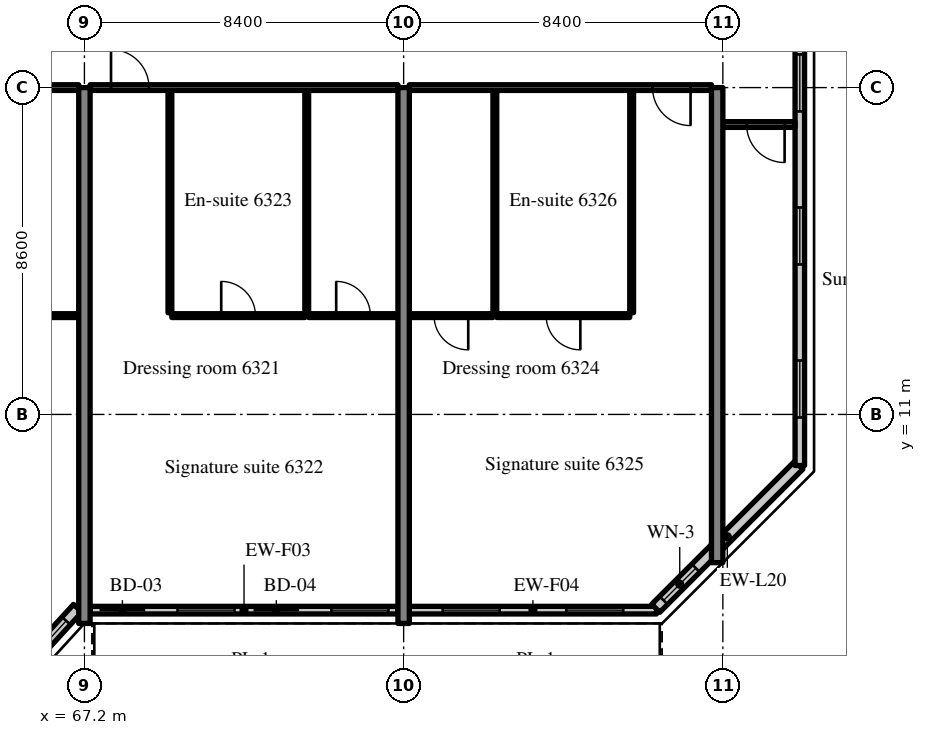
"""IFC4 building model, lengths in metres.
Left out: names, types, materials, properties, quantities, classifications, styles, units other than length and angle.
Written with IfcOpenShell. Run it as: python <this file> out.ifc"""

import sys

from ifc_helpers import new_model, si_unit, direction, frame, frame_2d, origin, place, context, subcontext, project, spatial, rectangle, extrude, source, transform, mapped, element, fill, save


model = new_model("IFC4")
c1 = context("Model", 3, precision=1e-05, world=origin(), true_north=direction((0.0, 1.0)))
c2 = subcontext(c1, "Body", "Model", "MODEL_VIEW")
j1 = project(units=[si_unit("LENGTHUNIT", "METRE"), si_unit("PLANEANGLEUNIT", "RADIAN")], contexts=[c1])
p1 = place(None, origin())
s1 = spatial("IfcSite", under=j1, at=p1, CompositionType="ELEMENT")
p2 = place(p1, origin())
s2 = spatial("IfcBuilding", under=s1, at=p2, CompositionType="ELEMENT")
p3 = place(p2, frame((0.0, 0.0, 260.8)))
s3 = spatial("IfcBuildingStorey", under=s2, at=p3, CompositionType="ELEMENT", Elevation=260.8)
m1 = source(origin(), c2, "Body", "SweptSolid", [
    extrude(rectangle(XDim=14.1, YDim=0.3, at=frame_2d((7.05, 0.0))), origin(), (0.0, 0.0, 1.0), 3.62),
])
for number, where, z_axis, x_axis in (
    (1, (67.2, 5.5, 0.0), (0.0, 0.0, 1.0), (0.0, 1.0, 0.0)),
    (2, (75.6, 5.5, 0.0), (0.0, 0.0, 1.0), (0.0, 1.0, 0.0)),
):
    element("IfcWall", number, at=place(p3, frame(where, z_axis=z_axis, x_axis=x_axis)), inside=s3, PredefinedType="SHEAR", context=c2, shape_type="MappedRepresentation", body=[
        mapped(m1, transform((0.0, 0.0, 0.0), scale=1.0)),
    ])
m2 = source(origin(), c2, "Body", "SweptSolid", [
    extrude(rectangle(XDim=12.5, YDim=0.3, at=frame_2d((6.25, 0.0))), origin(), (0.0, 0.0, 1.0), 3.62),
])
p4 = place(p3, frame((83.85, 7.1, 0.0), z_axis=(0.0, 0.0, 1.0), x_axis=(0.0, 1.0, 0.0)))
e3 = element("IfcWall", 3, at=p4, inside=s3, PredefinedType="SHEAR", context=c2, shape_type="MappedRepresentation", body=[
    mapped(m2, transform((0.0, 0.0, 0.0), scale=1.0)),
])
m3 = source(origin(), c2, "Body", "SweptSolid", [
    extrude(rectangle(XDim=2.398, YDim=0.3, at=frame_2d((1.199, 0.0))), origin(), (0.0, 0.0, 1.0), 3.62),
])
p5 = place(p3, frame((65.404, 4.131, 0.0), z_axis=(0.0, 0.0, 1.0), x_axis=(0.675374189419, 0.737475222815, 0.0)))
e4 = element("IfcWall", 4, at=p5, inside=s3, PredefinedType="SOLIDWALL", context=c2, shape_type="MappedRepresentation", body=[
    mapped(m3, transform((0.0, 0.0, 0.0), scale=1.0)),
])
m4 = source(origin(), c2, "Body", "SweptSolid", [
    extrude(rectangle(XDim=1.5, YDim=2.0, at=frame_2d((0.75, 1.0))), frame((0.0, 0.16, 0.0), z_axis=(0.0, -1.0, 0.0), x_axis=(1.0, 0.0, 0.0)), (0.0, 0.0, 1.0), 0.32),
])
p6 = place(p5, frame((0.449, 0.0, 0.9)))
e5 = element("IfcOpeningElement", 5, at=p6, cuts=e4, PredefinedType="OPENING", context=c2, shape_type="MappedRepresentation", body=[
    mapped(m4, transform((0.0, 0.0, 0.0), scale=1.0)),
])
m5 = source(origin(), c2, "Body", "SweptSolid", [
    extrude(rectangle(XDim=8.1, YDim=0.2, at=frame_2d((4.05, 0.0))), origin(), (0.0, 0.0, 1.0), 3.02),
])
p7 = place(p3, frame((67.35, 5.85, 0.0), z_axis=(0.0, 0.0, 1.0), x_axis=(1.0, 0.0, 0.0)))
e6 = element("IfcWall", 6, at=p7, inside=s3, PredefinedType="SOLIDWALL", context=c2, shape_type="MappedRepresentation", body=[
    mapped(m5, transform((0.0, 0.0, 0.0), scale=1.0)),
])
m6 = source(origin(), c2, "Body", "SweptSolid", [
    extrude(rectangle(XDim=1.2, YDim=2.4, at=frame_2d((0.6, 1.2))), frame((0.0, 0.11, 0.0), z_axis=(0.0, -1.0, 0.0), x_axis=(1.0, 0.0, 0.0)), (0.0, 0.0, 1.0), 0.22),
])
p8 = place(p7, frame((0.25, 0.0, 0.0)))
e7 = element("IfcOpeningElement", 7, at=p8, cuts=e6, PredefinedType="OPENING", context=c2, shape_type="MappedRepresentation", body=[
    mapped(m6, transform((0.0, 0.0, 0.0), scale=1.0)),
])
m7 = source(origin(), c2, "Body", "SweptSolid", [
    extrude(rectangle(XDim=1.5, YDim=1.5, at=frame_2d((0.75, 0.75))), frame((0.0, 0.11, 0.0), z_axis=(0.0, -1.0, 0.0), x_axis=(1.0, 0.0, 0.0)), (0.0, 0.0, 1.0), 0.22),
])
p9 = place(p7, frame((2.3, 0.0, 0.9)))
e8 = element("IfcOpeningElement", 8, at=p9, cuts=e6, PredefinedType="OPENING", context=c2, shape_type="MappedRepresentation", body=[
    mapped(m7, transform((0.0, 0.0, 0.0), scale=1.0)),
])
p10 = place(p7, frame((4.3, 0.0, 0.0)))
e9 = element("IfcOpeningElement", 9, at=p10, cuts=e6, PredefinedType="OPENING", context=c2, shape_type="MappedRepresentation", body=[
    mapped(m6, transform((0.0, 0.0, 0.0), scale=1.0)),
])
p11 = place(p7, frame((6.35, 0.0, 0.9)))
e10 = element("IfcOpeningElement", 10, at=p11, cuts=e6, PredefinedType="OPENING", context=c2, shape_type="MappedRepresentation", body=[
    mapped(m7, transform((0.0, 0.0, 0.0), scale=1.0)),
])
m8 = source(origin(), c2, "Body", "SweptSolid", [
    extrude(rectangle(XDim=6.505, YDim=0.2, at=frame_2d((3.252, 0.0))), origin(), (0.0, 0.0, 1.0), 3.02),
])
p12 = place(p3, frame((75.75, 5.85, 0.0), z_axis=(0.0, 0.0, 1.0), x_axis=(1.0, 0.0, 0.0)))
e11 = element("IfcWall", 11, at=p12, inside=s3, PredefinedType="SOLIDWALL", context=c2, shape_type="MappedRepresentation", body=[
    mapped(m8, transform((0.0, 0.0, 0.0), scale=1.0)),
])
p13 = place(p12, frame((0.876, 0.0, 0.9)))
e12 = element("IfcOpeningElement", 12, at=p13, cuts=e11, PredefinedType="OPENING", context=c2, shape_type="MappedRepresentation", body=[
    mapped(m7, transform((0.0, 0.0, 0.0), scale=1.0)),
])
p14 = place(p12, frame((4.129, 0.0, 0.9)))
e13 = element("IfcOpeningElement", 13, at=p14, cuts=e11, PredefinedType="OPENING", context=c2, shape_type="MappedRepresentation", body=[
    mapped(m7, transform((0.0, 0.0, 0.0), scale=1.0)),
])
m9 = source(origin(), c2, "Body", "SweptSolid", [
    extrude(rectangle(XDim=5.326, YDim=0.3, at=frame_2d((2.663, 0.0))), origin(), (0.0, 0.0, 1.0), 3.62),
])
p15 = place(p3, frame((82.234, 5.9, 0.0), z_axis=(0.0, 0.0, 1.0), x_axis=(0.707083859269, 0.707129702361, 0.0)))
e14 = element("IfcWall", 14, at=p15, inside=s3, PredefinedType="SOLIDWALL", context=c2, shape_type="MappedRepresentation", body=[
    mapped(m9, transform((0.0, 0.0, 0.0), scale=1.0)),
])
m10 = source(origin(), c2, "Body", "SweptSolid", [
    extrude(rectangle(XDim=1.2, YDim=1.5, at=frame_2d((0.6, 0.75))), frame((0.0, 0.16, 0.0), z_axis=(0.0, -1.0, 0.0), x_axis=(1.0, 0.0, 0.0)), (0.0, 0.0, 1.0), 0.32),
])
p16 = place(p15, frame((0.292, 0.0, 0.9)))
e15 = element("IfcOpeningElement", 15, at=p16, cuts=e14, PredefinedType="OPENING", context=c2, shape_type="MappedRepresentation", body=[
    mapped(m10, transform((0.0, 0.0, 0.0), scale=1.0)),
])
m11 = source(origin(), c2, "Body", "SweptSolid", [
    extrude(rectangle(XDim=28.189, YDim=0.25, at=frame_2d((14.095, 0.0))), origin(), (0.0, 0.0, 1.0), 3.62),
])
p17 = place(p3, frame((86.025, 9.655, 0.0), z_axis=(0.0, 0.0, 1.0), x_axis=(0.0, 1.0, 0.0)))
e16 = element("IfcWall", 16, at=p17, inside=s3, PredefinedType="SOLIDWALL", context=c2, shape_type="MappedRepresentation", body=[
    mapped(m11, transform((0.0, 0.0, 0.0), scale=1.0)),
])
m12 = source(origin(), c2, "Body", "SweptSolid", [
    extrude(rectangle(XDim=1.5, YDim=1.5, at=frame_2d((0.75, 0.75))), frame((0.0, 0.135, 0.0), z_axis=(0.0, -1.0, 0.0), x_axis=(1.0, 0.0, 0.0)), (0.0, 0.0, 1.0), 0.27),
])
p18 = place(p17, frame((1.263, 0.0, 0.9)))
e17 = element("IfcOpeningElement", 17, at=p18, cuts=e16, PredefinedType="OPENING", context=c2, shape_type="MappedRepresentation", body=[
    mapped(m12, transform((0.0, 0.0, 0.0), scale=1.0)),
])
p19 = place(p17, frame((5.291, 0.0, 0.9)))
e18 = element("IfcOpeningElement", 18, at=p19, cuts=e16, PredefinedType="OPENING", context=c2, shape_type="MappedRepresentation", body=[
    mapped(m12, transform((0.0, 0.0, 0.0), scale=1.0)),
])
p20 = place(p17, frame((9.318, 0.0, 0.9)))
e19 = element("IfcOpeningElement", 19, at=p20, cuts=e16, PredefinedType="OPENING", context=c2, shape_type="MappedRepresentation", body=[
    mapped(m12, transform((0.0, 0.0, 0.0), scale=1.0)),
])
p21 = place(p17, frame((13.345, 0.0, 0.9)))
e20 = element("IfcOpeningElement", 20, at=p21, cuts=e16, PredefinedType="OPENING", context=c2, shape_type="MappedRepresentation", body=[
    mapped(m12, transform((0.0, 0.0, 0.0), scale=1.0)),
])
p22 = place(p17, frame((17.372, 0.0, 0.9)))
e21 = element("IfcOpeningElement", 21, at=p22, cuts=e16, PredefinedType="OPENING", context=c2, shape_type="MappedRepresentation", body=[
    mapped(m12, transform((0.0, 0.0, 0.0), scale=1.0)),
])
p23 = place(p17, frame((21.399, 0.0, 0.9)))
e22 = element("IfcOpeningElement", 22, at=p23, cuts=e16, PredefinedType="OPENING", context=c2, shape_type="MappedRepresentation", body=[
    mapped(m12, transform((0.0, 0.0, 0.0), scale=1.0)),
])
p24 = place(p17, frame((25.426, 0.0, 0.9)))
e23 = element("IfcOpeningElement", 23, at=p24, cuts=e16, PredefinedType="OPENING", context=c2, shape_type="MappedRepresentation", body=[
    mapped(m12, transform((0.0, 0.0, 0.0), scale=1.0)),
])
m13 = source(origin(), c2, "Body", "SweptSolid", [
    extrude(rectangle(XDim=2.35, YDim=0.1, at=frame_2d((1.175, 0.0))), origin(), (0.0, 0.0, 1.0), 3.62),
])
p25 = place(p3, frame((64.7, 13.6, 0.0), z_axis=(0.0, 0.0, 1.0), x_axis=(1.0, 0.0, 0.0)))
e24 = element("IfcWall", 24, at=p25, inside=s3, PredefinedType="PARTITIONING", context=c2, shape_type="MappedRepresentation", body=[
    mapped(m13, transform((0.0, 0.0, 0.0), scale=1.0)),
])
m14 = source(origin(), c2, "Body", "SweptSolid", [
    extrude(rectangle(XDim=0.9, YDim=2.1, at=frame_2d((0.45, 1.05))), frame((0.0, 0.06, 0.0), z_axis=(0.0, -1.0, 0.0), x_axis=(1.0, 0.0, 0.0)), (0.0, 0.0, 1.0), 0.12),
])
p26 = place(p25, frame((0.725, 0.0, 0.0)))
e25 = element("IfcOpeningElement", 25, at=p26, cuts=e24, PredefinedType="OPENING", context=c2, shape_type="MappedRepresentation", body=[
    mapped(m14, transform((0.0, 0.0, 0.0), scale=1.0)),
])
m15 = source(origin(), c2, "Body", "SweptSolid", [
    extrude(rectangle(XDim=8.1, YDim=0.15, at=frame_2d((4.05, 0.0))), origin(), (0.0, 0.0, 1.0), 2.92),
])
p27 = place(p3, frame((58.95, 19.6, 0.0), z_axis=(0.0, 0.0, 1.0), x_axis=(1.0, 0.0, 0.0)))
e26 = element("IfcWall", 26, at=p27, inside=s3, PredefinedType="PARTITIONING", context=c2, shape_type="MappedRepresentation", body=[
    mapped(m15, transform((0.0, 0.0, 0.0), scale=1.0)),
])
m16 = source(origin(), c2, "Body", "SweptSolid", [
    extrude(rectangle(XDim=1.0, YDim=2.1, at=frame_2d((0.5, 1.05))), frame((0.0, 0.085, 0.0), z_axis=(0.0, -1.0, 0.0), x_axis=(1.0, 0.0, 0.0)), (0.0, 0.0, 1.0), 0.17),
])
p28 = place(p27, frame((0.55, 0.0, 0.0)))
e27 = element("IfcOpeningElement", 27, at=p28, cuts=e26, PredefinedType="OPENING", context=c2, shape_type="MappedRepresentation", body=[
    mapped(m16, transform((0.0, 0.0, 0.0), scale=1.0)),
])
m17 = source(origin(), c2, "Body", "SweptSolid", [
    extrude(rectangle(XDim=5.85, YDim=0.1, at=frame_2d((2.925, 0.0))), origin(), (0.0, 0.0, 1.0), 3.62),
])
for number, where, z_axis, x_axis in (
    (28, (69.45, 13.675, 0.0), (0.0, 0.0, 1.0), (0.0, 1.0, 0.0)),
    (29, (73.05, 13.675, 0.0), (0.0, 0.0, 1.0), (0.0, 1.0, 0.0)),
):
    element("IfcWall", number, at=place(p3, frame(where, z_axis=z_axis, x_axis=x_axis)), inside=s3, PredefinedType="PARTITIONING", context=c2, shape_type="MappedRepresentation", body=[
        mapped(m17, transform((0.0, 0.0, 0.0), scale=1.0)),
    ])
m18 = source(origin(), c2, "Body", "SweptSolid", [
    extrude(rectangle(XDim=3.5, YDim=0.1, at=frame_2d((1.75, 0.0))), origin(), (0.0, 0.0, 1.0), 3.62),
])
p29 = place(p3, frame((69.5, 13.6, 0.0), z_axis=(0.0, 0.0, 1.0), x_axis=(1.0, 0.0, 0.0)))
e30 = element("IfcWall", 30, at=p29, inside=s3, PredefinedType="PARTITIONING", context=c2, shape_type="MappedRepresentation", body=[
    mapped(m18, transform((0.0, 0.0, 0.0), scale=1.0)),
])
p30 = place(p29, frame((1.3, 0.0, 0.0)))
e31 = element("IfcOpeningElement", 31, at=p30, cuts=e30, PredefinedType="OPENING", context=c2, shape_type="MappedRepresentation", body=[
    mapped(m14, transform((0.0, 0.0, 0.0), scale=1.0)),
])
m19 = source(origin(), c2, "Body", "SweptSolid", [
    extrude(rectangle(XDim=2.35, YDim=0.1, at=frame_2d((1.175, 0.0))), origin(), (0.0, 0.0, 1.0), 3.62),
])
p31 = place(p3, frame((73.1, 13.6, 0.0), z_axis=(0.0, 0.0, 1.0), x_axis=(1.0, 0.0, 0.0)))
e32 = element("IfcWall", 32, at=p31, inside=s3, PredefinedType="PARTITIONING", context=c2, shape_type="MappedRepresentation", body=[
    mapped(m19, transform((0.0, 0.0, 0.0), scale=1.0)),
])
p32 = place(p31, frame((0.725, 0.0, 0.0)))
e33 = element("IfcOpeningElement", 33, at=p32, cuts=e32, PredefinedType="OPENING", context=c2, shape_type="MappedRepresentation", body=[
    mapped(m14, transform((0.0, 0.0, 0.0), scale=1.0)),
])
m20 = source(origin(), c2, "Body", "SweptSolid", [
    extrude(rectangle(XDim=8.1, YDim=0.15, at=frame_2d((4.05, 0.0))), origin(), (0.0, 0.0, 1.0), 2.92),
])
p33 = place(p3, frame((67.35, 19.6, 0.0), z_axis=(0.0, 0.0, 1.0), x_axis=(1.0, 0.0, 0.0)))
e34 = element("IfcWall", 34, at=p33, inside=s3, PredefinedType="PARTITIONING", context=c2, shape_type="MappedRepresentation", body=[
    mapped(m20, transform((0.0, 0.0, 0.0), scale=1.0)),
])
p34 = place(p33, frame((0.55, 0.0, 0.0)))
e35 = element("IfcOpeningElement", 35, at=p34, cuts=e34, PredefinedType="OPENING", context=c2, shape_type="MappedRepresentation", body=[
    mapped(m16, transform((0.0, 0.0, 0.0), scale=1.0)),
])
for number, where, z_axis, x_axis in (
    (36, (81.6, 13.675, 0.0), (0.0, 0.0, 1.0), (0.0, 1.0, 0.0)),
    (37, (78.0, 13.675, 0.0), (0.0, 0.0, 1.0), (0.0, 1.0, 0.0)),
):
    element("IfcWall", number, at=place(p3, frame(where, z_axis=z_axis, x_axis=x_axis)), inside=s3, PredefinedType="PARTITIONING", context=c2, shape_type="MappedRepresentation", body=[
        mapped(m17, transform((0.0, 0.0, 0.0), scale=1.0)),
    ])
p35 = place(p3, frame((78.05, 13.6, 0.0), z_axis=(0.0, 0.0, 1.0), x_axis=(1.0, 0.0, 0.0)))
e38 = element("IfcWall", 38, at=p35, inside=s3, PredefinedType="PARTITIONING", context=c2, shape_type="MappedRepresentation", body=[
    mapped(m18, transform((0.0, 0.0, 0.0), scale=1.0)),
])
p36 = place(p35, frame((1.3, 0.0, 0.0)))
e39 = element("IfcOpeningElement", 39, at=p36, cuts=e38, PredefinedType="OPENING", context=c2, shape_type="MappedRepresentation", body=[
    mapped(m14, transform((0.0, 0.0, 0.0), scale=1.0)),
])
m21 = source(origin(), c2, "Body", "SweptSolid", [
    extrude(rectangle(XDim=2.2, YDim=0.1, at=frame_2d((1.1, 0.0))), origin(), (0.0, 0.0, 1.0), 3.62),
])
p37 = place(p3, frame((75.75, 13.6, 0.0), z_axis=(0.0, 0.0, 1.0), x_axis=(1.0, 0.0, 0.0)))
e40 = element("IfcWall", 40, at=p37, inside=s3, PredefinedType="PARTITIONING", context=c2, shape_type="MappedRepresentation", body=[
    mapped(m21, transform((0.0, 0.0, 0.0), scale=1.0)),
])
p38 = place(p37, frame((0.65, 0.0, 0.0)))
e41 = element("IfcOpeningElement", 41, at=p38, cuts=e40, PredefinedType="OPENING", context=c2, shape_type="MappedRepresentation", body=[
    mapped(m14, transform((0.0, 0.0, 0.0), scale=1.0)),
])
m22 = source(origin(), c2, "Body", "SweptSolid", [
    extrude(rectangle(XDim=7.95, YDim=0.15, at=frame_2d((3.975, 0.0))), origin(), (0.0, 0.0, 1.0), 2.92),
])
p39 = place(p3, frame((75.75, 19.6, 0.0), z_axis=(0.0, 0.0, 1.0), x_axis=(1.0, 0.0, 0.0)))
e42 = element("IfcWall", 42, at=p39, inside=s3, PredefinedType="PARTITIONING", context=c2, shape_type="MappedRepresentation", body=[
    mapped(m22, transform((0.0, 0.0, 0.0), scale=1.0)),
])
p40 = place(p39, frame((6.4, 0.0, 0.0)))
e43 = element("IfcOpeningElement", 43, at=p40, cuts=e42, PredefinedType="OPENING", context=c2, shape_type="MappedRepresentation", body=[
    mapped(m16, transform((0.0, 0.0, 0.0), scale=1.0)),
])
m23 = source(origin(), c2, "Body", "SweptSolid", [
    extrude(rectangle(XDim=1.9, YDim=0.15, at=frame_2d((0.95, 0.0))), origin(), (0.0, 0.0, 1.0), 2.92),
])
p41 = place(p3, frame((84.0, 18.628, 0.0), z_axis=(0.0, 0.0, 1.0), x_axis=(1.0, 0.0, 0.0)))
e44 = element("IfcWall", 44, at=p41, inside=s3, PredefinedType="PARTITIONING", context=c2, shape_type="MappedRepresentation", body=[
    mapped(m23, transform((0.0, 0.0, 0.0), scale=1.0)),
])
p42 = place(p41, frame((0.625, 0.0, 0.0)))
e45 = element("IfcOpeningElement", 45, at=p42, cuts=e44, PredefinedType="OPENING", context=c2, shape_type="MappedRepresentation", body=[
    mapped(m16, transform((0.0, 0.0, 0.0), scale=1.0)),
])
m24 = source(origin(), c2, "Body", "SweptSolid", [
    extrude(rectangle(XDim=1.5, YDim=2.0, at=frame_2d((0.75, 1.0))), frame((0.0, 0.03, 0.0), z_axis=(0.0, -1.0, 0.0), x_axis=(1.0, 0.0, 0.0)), (0.0, 0.0, 1.0), 0.06),
])
p43 = place(p6, origin())
e46 = element("IfcWindow", 46, at=p43, inside=s3, PartitioningType="SINGLE_PANEL", PredefinedType="WINDOW", context=c2, shape_type="MappedRepresentation", body=[
    mapped(m24, transform((0.0, 0.0, 0.0), scale=1.0)),
])
fill(e5, e46)
m25 = source(origin(), c2, "Body", "SweptSolid", [
    extrude(rectangle(XDim=1.2, YDim=2.4, at=frame_2d((0.6, 1.2))), frame((0.0, 0.025, 0.0), z_axis=(0.0, -1.0, 0.0), x_axis=(1.0, 0.0, 0.0)), (0.0, 0.0, 1.0), 0.05),
])
p44 = place(p8, origin())
e47 = element("IfcDoor", 47, at=p44, inside=s3, OperationType="SLIDING_TO_LEFT", PredefinedType="DOOR", context=c2, shape_type="MappedRepresentation", body=[
    mapped(m25, transform((0.0, 0.0, 0.0), scale=1.0)),
])
fill(e7, e47)
m26 = source(origin(), c2, "Body", "SweptSolid", [
    extrude(rectangle(XDim=1.5, YDim=1.5, at=frame_2d((0.75, 0.75))), frame((0.0, 0.03, 0.0), z_axis=(0.0, -1.0, 0.0), x_axis=(1.0, 0.0, 0.0)), (0.0, 0.0, 1.0), 0.06),
])
p45 = place(p9, origin())
e48 = element("IfcWindow", 48, at=p45, inside=s3, PartitioningType="SINGLE_PANEL", PredefinedType="WINDOW", context=c2, shape_type="MappedRepresentation", body=[
    mapped(m26, transform((0.0, 0.0, 0.0), scale=1.0)),
])
fill(e8, e48)
p46 = place(p10, origin())
e49 = element("IfcDoor", 49, at=p46, inside=s3, OperationType="SLIDING_TO_RIGHT", PredefinedType="DOOR", context=c2, shape_type="MappedRepresentation", body=[
    mapped(m25, transform((0.0, 0.0, 0.0), scale=1.0)),
])
fill(e9, e49)
p47 = place(p11, origin())
e50 = element("IfcWindow", 50, at=p47, inside=s3, PartitioningType="SINGLE_PANEL", PredefinedType="WINDOW", context=c2, shape_type="MappedRepresentation", body=[
    mapped(m26, transform((0.0, 0.0, 0.0), scale=1.0)),
])
fill(e10, e50)
p48 = place(p13, origin())
e51 = element("IfcWindow", 51, at=p48, inside=s3, PartitioningType="SINGLE_PANEL", PredefinedType="WINDOW", context=c2, shape_type="MappedRepresentation", body=[
    mapped(m26, transform((0.0, 0.0, 0.0), scale=1.0)),
])
fill(e12, e51)
p49 = place(p14, origin())
e52 = element("IfcWindow", 52, at=p49, inside=s3, PartitioningType="SINGLE_PANEL", PredefinedType="WINDOW", context=c2, shape_type="MappedRepresentation", body=[
    mapped(m26, transform((0.0, 0.0, 0.0), scale=1.0)),
])
fill(e13, e52)
m27 = source(origin(), c2, "Body", "SweptSolid", [
    extrude(rectangle(XDim=1.2, YDim=1.5, at=frame_2d((0.6, 0.75))), frame((0.0, 0.03, 0.0), z_axis=(0.0, -1.0, 0.0), x_axis=(1.0, 0.0, 0.0)), (0.0, 0.0, 1.0), 0.06),
])
p50 = place(p16, origin())
e53 = element("IfcWindow", 53, at=p50, inside=s3, PartitioningType="SINGLE_PANEL", PredefinedType="WINDOW", context=c2, shape_type="MappedRepresentation", body=[
    mapped(m27, transform((0.0, 0.0, 0.0), scale=1.0)),
])
fill(e15, e53)
p51 = place(p18, origin())
e54 = element("IfcWindow", 54, at=p51, inside=s3, PartitioningType="SINGLE_PANEL", PredefinedType="WINDOW", context=c2, shape_type="MappedRepresentation", body=[
    mapped(m26, transform((0.0, 0.0, 0.0), scale=1.0)),
])
fill(e17, e54)
p52 = place(p19, origin())
e55 = element("IfcWindow", 55, at=p52, inside=s3, PartitioningType="SINGLE_PANEL", PredefinedType="WINDOW", context=c2, shape_type="MappedRepresentation", body=[
    mapped(m26, transform((0.0, 0.0, 0.0), scale=1.0)),
])
fill(e18, e55)
p53 = place(p20, origin())
e56 = element("IfcWindow", 56, at=p53, inside=s3, PartitioningType="SINGLE_PANEL", PredefinedType="WINDOW", context=c2, shape_type="MappedRepresentation", body=[
    mapped(m26, transform((0.0, 0.0, 0.0), scale=1.0)),
])
fill(e19, e56)
m28 = source(origin(), c2, "Body", "SweptSolid", [
    extrude(rectangle(XDim=0.9, YDim=2.1, at=frame_2d((0.45, 1.05))), frame((0.0, 0.025, 0.0), z_axis=(0.0, -1.0, 0.0), x_axis=(1.0, 0.0, 0.0)), (0.0, 0.0, 1.0), 0.05),
])
p54 = place(p30, origin())
e57 = element("IfcDoor", 57, at=p54, inside=s3, OperationType="SINGLE_SWING_LEFT", PredefinedType="DOOR", context=c2, shape_type="MappedRepresentation", body=[
    mapped(m28, transform((0.0, 0.0, 0.0), scale=1.0)),
])
fill(e31, e57)
p55 = place(p32, origin())
e58 = element("IfcDoor", 58, at=p55, inside=s3, OperationType="SINGLE_SWING_LEFT", PredefinedType="DOOR", context=c2, shape_type="MappedRepresentation", body=[
    mapped(m28, transform((0.0, 0.0, 0.0), scale=1.0)),
])
fill(e33, e58)
m29 = source(origin(), c2, "Body", "SweptSolid", [
    extrude(rectangle(XDim=1.0, YDim=2.1, at=frame_2d((0.5, 1.05))), frame((0.0, 0.025, 0.0), z_axis=(0.0, -1.0, 0.0), x_axis=(1.0, 0.0, 0.0)), (0.0, 0.0, 1.0), 0.05),
])
p56 = place(p34, origin())
e59 = element("IfcDoor", 59, at=p56, inside=s3, OperationType="SINGLE_SWING_LEFT", PredefinedType="DOOR", context=c2, shape_type="MappedRepresentation", body=[
    mapped(m29, transform((0.0, 0.0, 0.0), scale=1.0)),
])
fill(e35, e59)
p57 = place(p36, origin())
e60 = element("IfcDoor", 60, at=p57, inside=s3, OperationType="SINGLE_SWING_RIGHT", PredefinedType="DOOR", context=c2, shape_type="MappedRepresentation", body=[
    mapped(m28, transform((0.0, 0.0, 0.0), scale=1.0)),
])
fill(e39, e60)
p58 = place(p38, origin())
e61 = element("IfcDoor", 61, at=p58, inside=s3, OperationType="SINGLE_SWING_RIGHT", PredefinedType="DOOR", context=c2, shape_type="MappedRepresentation", body=[
    mapped(m28, transform((0.0, 0.0, 0.0), scale=1.0)),
])
fill(e41, e61)
p59 = place(p40, origin())
e62 = element("IfcDoor", 62, at=p59, inside=s3, OperationType="SINGLE_SWING_RIGHT", PredefinedType="DOOR", context=c2, shape_type="MappedRepresentation", body=[
    mapped(m29, transform((0.0, 0.0, 0.0), scale=1.0)),
])
fill(e43, e62)
p60 = place(p42, origin())
e63 = element("IfcDoor", 63, at=p60, inside=s3, OperationType="SINGLE_SWING_RIGHT", PredefinedType="DOOR", context=c2, shape_type="MappedRepresentation", body=[
    mapped(m29, transform((0.0, 0.0, 0.0), scale=1.0)),
])
fill(e45, e63)
save(model, sys.argv[1])
